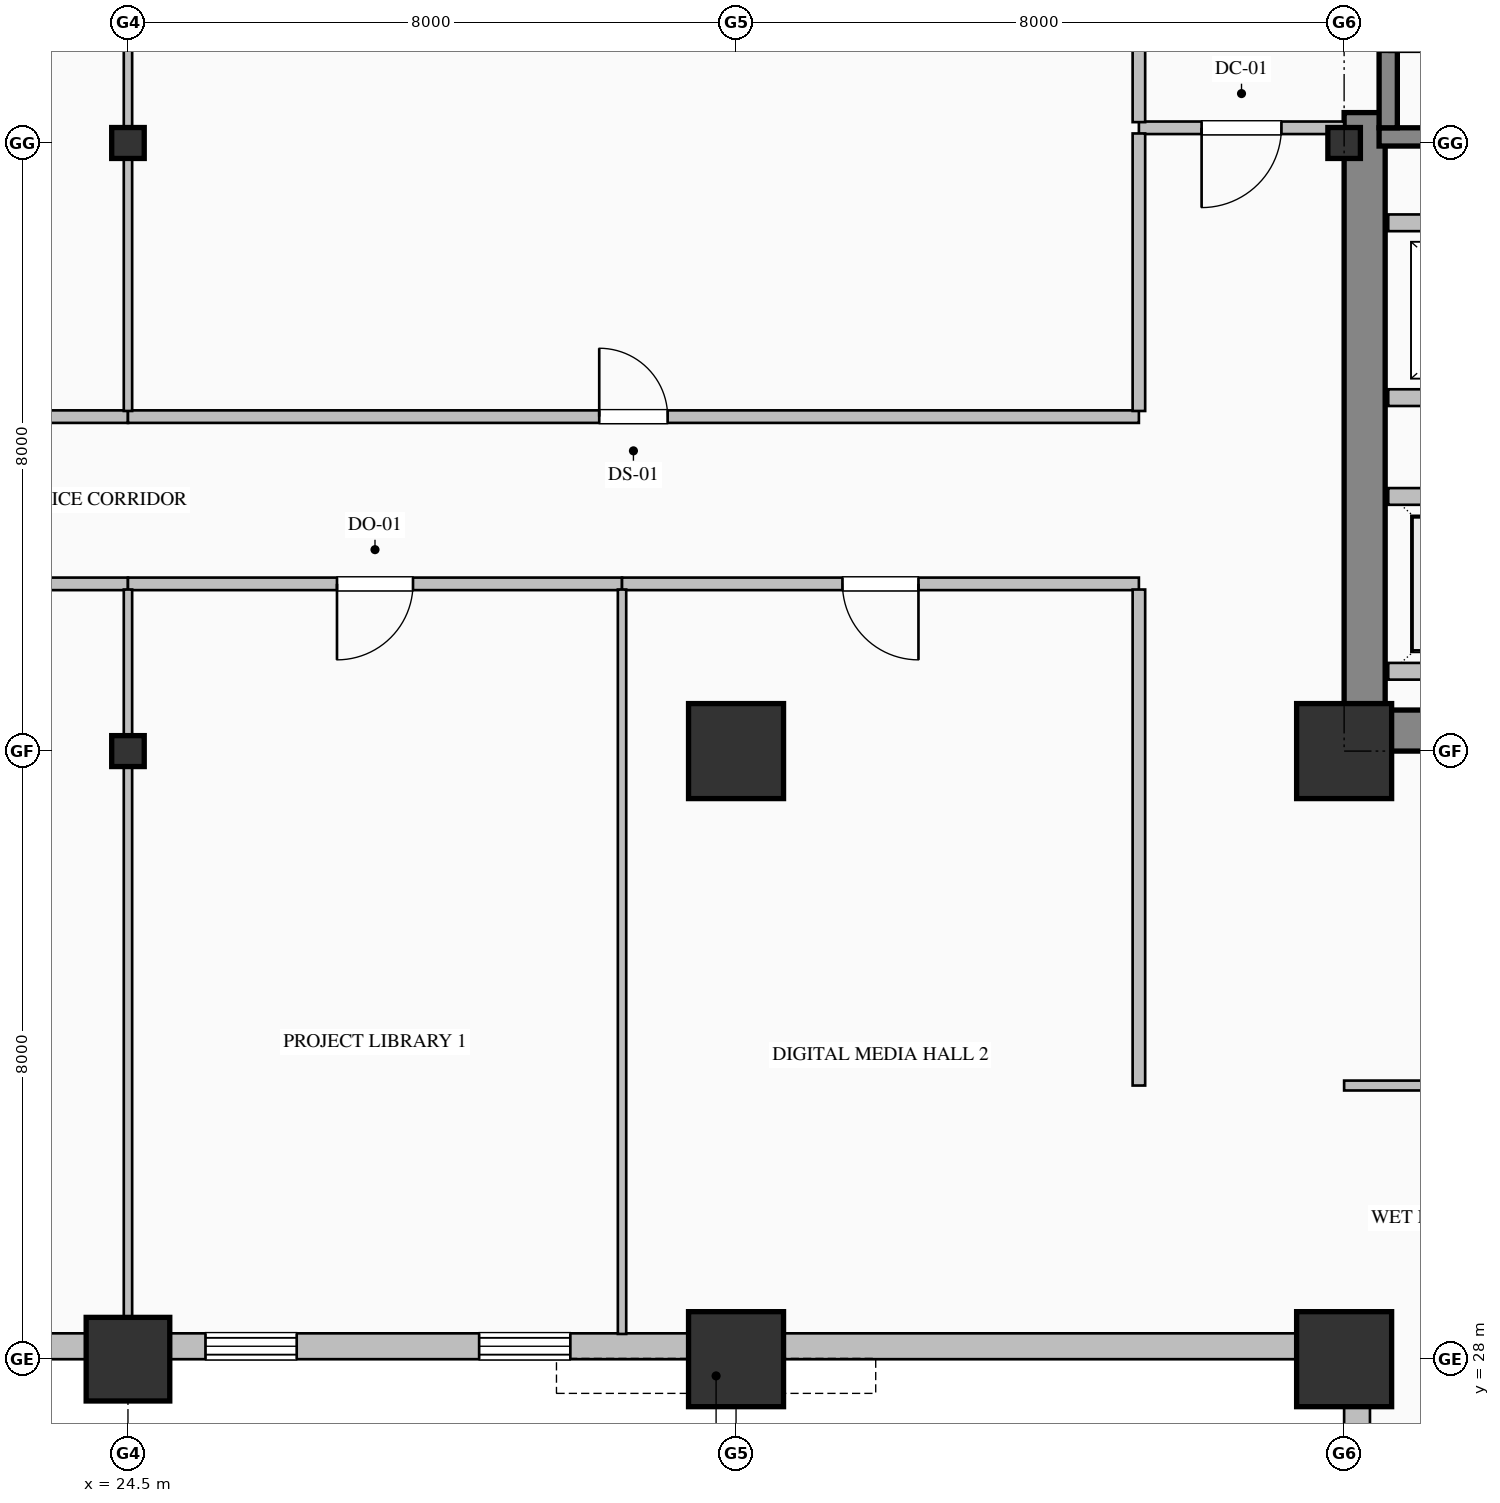
"""IFC4 building model, lengths in metres.
Left out: names, types, materials, properties, quantities, classifications, styles, units other than length and angle.
Written with IfcOpenShell. Run it as: python <this file> out.ifc"""

import sys

from ifc_helpers import new_model, si_unit, direction, frame, frame_2d, origin, origin_2d, place, context, subcontext, project, spatial, rectangle, hollow_rectangle, i_section, extrude, element, fill, save


model = new_model("IFC4")
c1 = context("Model", 3, precision=1e-05, world=origin(), true_north=direction((0.0, 1.0)))
c2 = subcontext(c1, "Body", "Model", "MODEL_VIEW")
j1 = project(units=[si_unit("LENGTHUNIT", "METRE"), si_unit("PLANEANGLEUNIT", "RADIAN")], contexts=[c1])
p1 = place(None, origin())
s1 = spatial("IfcSite", under=j1, at=p1, CompositionType="ELEMENT")
p2 = place(p1, origin())
s2 = spatial("IfcBuilding", under=s1, at=p2, CompositionType="ELEMENT")
p3 = place(p2, frame((0.0, 0.0, 56.2)))
s3 = spatial("IfcBuildingStorey", under=s2, at=p3, CompositionType="ELEMENT", Elevation=56.2)
p4 = place(p3, frame((40.77, 36.54, 0.0), z_axis=(0.0, 0.0, 1.0), x_axis=(0.0, 1.0, 0.0)))
e1 = element("IfcWall", 1, at=p4, inside=s3, PredefinedType="SHEAR", context=c2, shape_type="SweptSolid", body=[
    extrude(rectangle(XDim=7.86, YDim=0.54, at=frame_2d((3.93, 0.0))), origin(), (0.0, 0.0, 1.0), 3.75),
])
p5 = place(p3, frame((40.5, 36.27, 0.0), z_axis=(0.0, 0.0, 1.0), x_axis=(1.0, 0.0, 0.0)))
e2 = element("IfcWall", 2, at=p5, inside=s3, PredefinedType="SHEAR", context=c2, shape_type="SweptSolid", body=[
    extrude(rectangle(XDim=1.7, YDim=0.54, at=frame_2d((0.85, 0.0))), origin(), (0.0, 0.0, 1.0), 3.75),
])
p6 = place(p3, frame((24.5, 28.0, 0.0), z_axis=(0.0, 0.0, 1.0), x_axis=(1.0, 0.0, 0.0)))
e3 = element("IfcColumn", 3, at=p6, inside=s3, PredefinedType="COLUMN", context=c2, shape_type="SweptSolid", body=[
    extrude(hollow_rectangle(XDim=1.1, YDim=1.1, WallThickness=0.04, at=origin_2d()), origin(), (0.0, 0.0, 1.0), 4.0),
])
for number, where, z_axis, x_axis in (
    (4, (24.5, 36.0, 0.0), (0.0, 0.0, 1.0), (1.0, 0.0, 0.0)),
    (5, (24.5, 44.0, 0.0), (0.0, 0.0, 1.0), (1.0, 0.0, 0.0)),
):
    element("IfcColumn", number, at=place(p3, frame(where, z_axis=z_axis, x_axis=x_axis)), inside=s3, PredefinedType="COLUMN", context=c2, shape_type="SweptSolid", body=[
        extrude(i_section(OverallWidth=0.407, OverallDepth=0.428, WebThickness=0.02, FlangeThickness=0.035, FilletRadius=0.022, at=origin_2d()), origin(), (0.0, 0.0, 1.0), 4.0),
    ])
for number, where, z_axis, x_axis in (
    (6, (32.5, 28.0, 0.0), (0.0, 0.0, 1.0), (1.0, 0.0, 0.0)),
    (7, (32.5, 36.0, 0.0), (0.0, 0.0, 1.0), (1.0, 0.0, 0.0)),
    (8, (40.5, 28.0, 0.0), (0.0, 0.0, 1.0), (1.0, 0.0, 0.0)),
    (9, (40.5, 36.0, 0.0), (0.0, 0.0, 1.0), (1.0, 0.0, 0.0)),
):
    element("IfcColumn", number, at=place(p3, frame(where, z_axis=z_axis, x_axis=x_axis)), inside=s3, PredefinedType="COLUMN", context=c2, shape_type="SweptSolid", body=[
        extrude(hollow_rectangle(XDim=1.25, YDim=1.25, WallThickness=0.045, at=origin_2d()), origin(), (0.0, 0.0, 1.0), 4.0),
    ])
p7 = place(p3, frame((40.5, 44.0, 0.0), z_axis=(0.0, 0.0, 1.0), x_axis=(1.0, 0.0, 0.0)))
e10 = element("IfcColumn", 10, at=p7, inside=s3, PredefinedType="COLUMN", context=c2, shape_type="SweptSolid", body=[
    extrude(i_section(OverallWidth=0.407, OverallDepth=0.428, WebThickness=0.02, FlangeThickness=0.035, FilletRadius=0.022, at=origin_2d()), origin(), (0.0, 0.0, 1.0), 4.0),
])
p8 = place(p3, frame((40.67, 8.0, 0.0), z_axis=(0.0, 0.0, 1.0), x_axis=(0.0, 1.0, 0.0)))
e11 = element("IfcWall", 11, at=p8, inside=s3, PredefinedType="SOLIDWALL", context=c2, shape_type="SweptSolid", body=[
    extrude(rectangle(XDim=20.34, YDim=0.34, at=frame_2d((10.17, 0.0))), origin(), (0.0, 0.0, 1.0), 3.05),
])
p9 = place(p8, frame((6.6, 0.0, 0.7)))
e12 = element("IfcOpeningElement", 12, at=p9, cuts=e11, PredefinedType="OPENING", context=c2, shape_type="SweptSolid", body=[
    extrude(rectangle(XDim=1.2, YDim=1.85, at=frame_2d((0.6, 0.925))), frame((0.0, 0.18, 0.0), z_axis=(0.0, -1.0, 0.0), x_axis=(1.0, 0.0, 0.0)), (0.0, 0.0, 1.0), 0.36),
])
p10 = place(p8, frame((13.8, 0.0, 0.7)))
e13 = element("IfcOpeningElement", 13, at=p10, cuts=e11, PredefinedType="OPENING", context=c2, shape_type="SweptSolid", body=[
    extrude(rectangle(XDim=1.2, YDim=1.85, at=frame_2d((0.6, 0.925))), frame((0.0, 0.18, 0.0), z_axis=(0.0, -1.0, 0.0), x_axis=(1.0, 0.0, 0.0)), (0.0, 0.0, 1.0), 0.36),
])
p11 = place(p3, frame((40.52, 28.17, 0.0), z_axis=(0.0, 0.0, 1.0), x_axis=(-1.0, 0.0, 0.0)))
e14 = element("IfcWall", 14, at=p11, inside=s3, PredefinedType="SOLIDWALL", context=c2, shape_type="SweptSolid", body=[
    extrude(rectangle(XDim=36.52, YDim=0.34, at=frame_2d((18.26, 0.0))), origin(), (0.0, 0.0, 1.0), 3.05),
])
p12 = place(p11, frame((10.2, 0.0, 0.7)))
e15 = element("IfcOpeningElement", 15, at=p12, cuts=e14, PredefinedType="OPENING", context=c2, shape_type="SweptSolid", body=[
    extrude(rectangle(XDim=1.2, YDim=1.85, at=frame_2d((0.6, 0.925))), frame((0.0, 0.18, 0.0), z_axis=(0.0, -1.0, 0.0), x_axis=(1.0, 0.0, 0.0)), (0.0, 0.0, 1.0), 0.36),
])
p13 = place(p11, frame((13.8, 0.0, 0.7)))
e16 = element("IfcOpeningElement", 16, at=p13, cuts=e14, PredefinedType="OPENING", context=c2, shape_type="SweptSolid", body=[
    extrude(rectangle(XDim=1.2, YDim=1.85, at=frame_2d((0.6, 0.925))), frame((0.0, 0.18, 0.0), z_axis=(0.0, -1.0, 0.0), x_axis=(1.0, 0.0, 0.0)), (0.0, 0.0, 1.0), 0.36),
])
p14 = place(p11, frame((17.4, 0.0, 0.7)))
e17 = element("IfcOpeningElement", 17, at=p14, cuts=e14, PredefinedType="OPENING", context=c2, shape_type="SweptSolid", body=[
    extrude(rectangle(XDim=1.2, YDim=1.85, at=frame_2d((0.6, 0.925))), frame((0.0, 0.18, 0.0), z_axis=(0.0, -1.0, 0.0), x_axis=(1.0, 0.0, 0.0)), (0.0, 0.0, 1.0), 0.36),
])
p15 = place(p11, frame((21.0, 0.0, 0.7)))
e18 = element("IfcOpeningElement", 18, at=p15, cuts=e14, PredefinedType="OPENING", context=c2, shape_type="SweptSolid", body=[
    extrude(rectangle(XDim=1.2, YDim=1.85, at=frame_2d((0.6, 0.925))), frame((0.0, 0.18, 0.0), z_axis=(0.0, -1.0, 0.0), x_axis=(1.0, 0.0, 0.0)), (0.0, 0.0, 1.0), 0.36),
])
p16 = place(p11, frame((28.2, 0.0, 0.7)))
e19 = element("IfcOpeningElement", 19, at=p16, cuts=e14, PredefinedType="OPENING", context=c2, shape_type="SweptSolid", body=[
    extrude(rectangle(XDim=1.2, YDim=1.85, at=frame_2d((0.6, 0.925))), frame((0.0, 0.18, 0.0), z_axis=(0.0, -1.0, 0.0), x_axis=(1.0, 0.0, 0.0)), (0.0, 0.0, 1.0), 0.36),
])
p17 = place(p3, frame((49.04, 44.08, 0.0), z_axis=(0.0, 0.0, 1.0), x_axis=(-1.0, 0.0, 0.0)))
e20 = element("IfcWall", 20, at=p17, inside=s3, PredefinedType="SOLIDWALL", context=c2, shape_type="SweptSolid", body=[
    extrude(rectangle(XDim=8.08, YDim=0.24, at=frame_2d((4.04, 0.0))), origin(), (0.0, 0.0, 1.0), 4.0),
])
p18 = place(p3, frame((41.08, 47.35, 0.0), z_axis=(0.0, 0.0, 1.0), x_axis=(0.0, -1.0, 0.0)))
e21 = element("IfcWall", 21, at=p18, inside=s3, PredefinedType="SOLIDWALL", context=c2, shape_type="SweptSolid", body=[
    extrude(rectangle(XDim=3.15, YDim=0.24, at=frame_2d((1.575, 0.0))), origin(), (0.0, 0.0, 1.0), 4.0),
])
p19 = place(p18, frame((1.0, 0.0, 0.0)))
e22 = element("IfcOpeningElement", 22, at=p19, cuts=e21, PredefinedType="OPENING", context=c2, shape_type="SweptSolid", body=[
    extrude(rectangle(XDim=1.15, YDim=2.2, at=frame_2d((0.575, 1.1))), frame((0.0, 0.13, 0.0), z_axis=(0.0, -1.0, 0.0), x_axis=(1.0, 0.0, 0.0)), (0.0, 0.0, 1.0), 0.26),
])
p20 = place(p3, frame((49.32, 37.05, 0.0), z_axis=(0.0, 0.0, 1.0), x_axis=(-1.0, 0.0, 0.0)))
e23 = element("IfcWall", 23, at=p20, inside=s3, PredefinedType="PARTITIONING", context=c2, shape_type="SweptSolid", body=[
    extrude(rectangle(XDim=8.24, YDim=0.22, at=frame_2d((4.12, 0.0))), origin(), (0.0, 0.0, 1.0), 3.75),
])
p21 = place(p20, frame((6.37, 0.0, 0.0)))
e24 = element("IfcOpeningElement", 24, at=p21, cuts=e23, PredefinedType="OPENING", context=c2, shape_type="SweptSolid", body=[
    extrude(rectangle(XDim=1.1, YDim=2.2, at=frame_2d((0.55, 1.1))), frame((0.0, 0.12, 0.0), z_axis=(0.0, -1.0, 0.0), x_axis=(1.0, 0.0, 0.0)), (0.0, 0.0, 1.0), 0.24),
])
p22 = place(p20, frame((3.57, 0.0, 0.0)))
e25 = element("IfcOpeningElement", 25, at=p22, cuts=e23, PredefinedType="OPENING", context=c2, shape_type="SweptSolid", body=[
    extrude(rectangle(XDim=1.1, YDim=2.2, at=frame_2d((0.55, 1.1))), frame((0.0, 0.12, 0.0), z_axis=(0.0, -1.0, 0.0), x_axis=(1.0, 0.0, 0.0)), (0.0, 0.0, 1.0), 0.24),
])
p23 = place(p20, frame((0.77, 0.0, 0.0)))
e26 = element("IfcOpeningElement", 26, at=p23, cuts=e23, PredefinedType="OPENING", context=c2, shape_type="SweptSolid", body=[
    extrude(rectangle(XDim=1.1, YDim=2.2, at=frame_2d((0.55, 1.1))), frame((0.0, 0.12, 0.0), z_axis=(0.0, -1.0, 0.0), x_axis=(1.0, 0.0, 0.0)), (0.0, 0.0, 1.0), 0.24),
])
for number, where, z_axis, x_axis in (
    (27, (41.08, 39.35, 0.0), (0.0, 0.0, 1.0), (1.0, 0.0, 0.0)),
    (28, (49.32, 40.65, 0.0), (0.0, 0.0, 1.0), (-1.0, 0.0, 0.0)),
    (29, (41.08, 42.95, 0.0), (0.0, 0.0, 1.0), (1.0, 0.0, 0.0)),
):
    element("IfcWall", number, at=place(p3, frame(where, z_axis=z_axis, x_axis=x_axis)), inside=s3, PredefinedType="PARTITIONING", context=c2, shape_type="SweptSolid", body=[
        extrude(rectangle(XDim=8.24, YDim=0.22, at=frame_2d((4.12, 0.0))), origin(), (0.0, 0.0, 1.0), 3.75),
    ])
p24 = place(p3, frame((40.5, 44.2, 0.0), z_axis=(0.0, 0.0, 1.0), x_axis=(-1.0, 0.0, 0.0)))
e30 = element("IfcWall", 30, at=p24, inside=s3, PredefinedType="PARTITIONING", context=c2, shape_type="SweptSolid", body=[
    extrude(rectangle(XDim=2.7, YDim=0.165, at=frame_2d((1.35, 0.0))), origin(), (0.0, 0.0, 1.0), 3.75),
])
p25 = place(p24, frame((0.825, 0.0, 0.0)))
e31 = element("IfcOpeningElement", 31, at=p25, cuts=e30, PredefinedType="OPENING", context=c2, shape_type="SweptSolid", body=[
    extrude(rectangle(XDim=1.05, YDim=2.15, at=frame_2d((0.525, 1.075))), frame((0.0, 0.093, 0.0), z_axis=(0.0, -1.0, 0.0), x_axis=(1.0, 0.0, 0.0)), (0.0, 0.0, 1.0), 0.185),
])
p26 = place(p3, frame((37.8, 44.274, 0.0), z_axis=(0.0, 0.0, 1.0), x_axis=(0.0, 1.0, 0.0)))
e32 = element("IfcWall", 32, at=p26, inside=s3, PredefinedType="PARTITIONING", context=c2, shape_type="SweptSolid", body=[
    extrude(rectangle(XDim=3.051, YDim=0.165, at=frame_2d((1.525, 0.0))), origin(), (0.0, 0.0, 1.0), 3.75),
])
p27 = place(p3, frame((24.5, 38.2, 0.0), z_axis=(0.0, 0.0, 1.0), x_axis=(-1.0, 0.0, 0.0)))
e33 = element("IfcWall", 33, at=p27, inside=s3, PredefinedType="PARTITIONING", context=c2, shape_type="SweptSolid", body=[
    extrude(rectangle(XDim=15.5, YDim=0.165, at=frame_2d((7.75, 0.0))), origin(), (0.0, 0.0, 1.0), 3.75),
])
p28 = place(p27, frame((7.25, 0.0, 0.0)))
e34 = element("IfcOpeningElement", 34, at=p28, cuts=e33, PredefinedType="OPENING", context=c2, shape_type="SweptSolid", body=[
    extrude(rectangle(XDim=1.0, YDim=2.15, at=frame_2d((0.5, 1.075))), frame((0.0, 0.093, 0.0), z_axis=(0.0, -1.0, 0.0), x_axis=(1.0, 0.0, 0.0)), (0.0, 0.0, 1.0), 0.185),
])
p29 = place(p3, frame((9.0, 40.4, 0.0), z_axis=(0.0, 0.0, 1.0), x_axis=(1.0, 0.0, 0.0)))
e35 = element("IfcWall", 35, at=p29, inside=s3, PredefinedType="PARTITIONING", context=c2, shape_type="SweptSolid", body=[
    extrude(rectangle(XDim=15.5, YDim=0.165, at=frame_2d((7.75, 0.0))), origin(), (0.0, 0.0, 1.0), 3.75),
])
p30 = place(p3, frame((24.5, 40.4, 0.0), z_axis=(0.0, 0.0, 1.0), x_axis=(1.0, 0.0, 0.0)))
e36 = element("IfcWall", 36, at=p30, inside=s3, PredefinedType="PARTITIONING", context=c2, shape_type="SweptSolid", body=[
    extrude(rectangle(XDim=13.3, YDim=0.165, at=frame_2d((6.65, 0.0))), origin(), (0.0, 0.0, 1.0), 3.75),
])
p31 = place(p30, frame((6.2, 0.0, 0.0)))
e37 = element("IfcOpeningElement", 37, at=p31, cuts=e36, PredefinedType="OPENING", context=c2, shape_type="SweptSolid", body=[
    extrude(rectangle(XDim=0.9, YDim=2.15, at=frame_2d((0.45, 1.075))), frame((0.0, 0.093, 0.0), z_axis=(0.0, -1.0, 0.0), x_axis=(1.0, 0.0, 0.0)), (0.0, 0.0, 1.0), 0.185),
])
p32 = place(p3, frame((31.0, 38.2, 0.0), z_axis=(0.0, 0.0, 1.0), x_axis=(-1.0, 0.0, 0.0)))
e38 = element("IfcWall", 38, at=p32, inside=s3, PredefinedType="PARTITIONING", context=c2, shape_type="SweptSolid", body=[
    extrude(rectangle(XDim=6.5, YDim=0.165, at=frame_2d((3.25, 0.0))), origin(), (0.0, 0.0, 1.0), 3.75),
])
p33 = place(p32, frame((2.75, 0.0, 0.0)))
e39 = element("IfcOpeningElement", 39, at=p33, cuts=e38, PredefinedType="OPENING", context=c2, shape_type="SweptSolid", body=[
    extrude(rectangle(XDim=1.0, YDim=2.15, at=frame_2d((0.5, 1.075))), frame((0.0, 0.093, 0.0), z_axis=(0.0, -1.0, 0.0), x_axis=(1.0, 0.0, 0.0)), (0.0, 0.0, 1.0), 0.185),
])
p34 = place(p3, frame((37.8, 38.2, 0.0), z_axis=(0.0, 0.0, 1.0), x_axis=(-1.0, 0.0, 0.0)))
e40 = element("IfcWall", 40, at=p34, inside=s3, PredefinedType="PARTITIONING", context=c2, shape_type="SweptSolid", body=[
    extrude(rectangle(XDim=6.8, YDim=0.165, at=frame_2d((3.4, 0.0))), origin(), (0.0, 0.0, 1.0), 3.75),
])
p35 = place(p34, frame((2.9, 0.0, 0.0)))
e41 = element("IfcOpeningElement", 41, at=p35, cuts=e40, PredefinedType="OPENING", context=c2, shape_type="SweptSolid", body=[
    extrude(rectangle(XDim=1.0, YDim=2.15, at=frame_2d((0.5, 1.075))), frame((0.0, 0.093, 0.0), z_axis=(0.0, -1.0, 0.0), x_axis=(1.0, 0.0, 0.0)), (0.0, 0.0, 1.0), 0.185),
])
p36 = place(p3, frame((37.8, 40.475, 0.0), z_axis=(0.0, 0.0, 1.0), x_axis=(0.0, 1.0, 0.0)))
e42 = element("IfcWall", 42, at=p36, inside=s3, PredefinedType="PARTITIONING", context=c2, shape_type="SweptSolid", body=[
    extrude(rectangle(XDim=3.651, YDim=0.165, at=frame_2d((1.825, 0.0))), origin(), (0.0, 0.0, 1.0), 3.75),
])
p37 = place(p3, frame((37.8, 31.6, 0.0), z_axis=(0.0, 0.0, 1.0), x_axis=(0.0, 1.0, 0.0)))
e43 = element("IfcWall", 43, at=p37, inside=s3, PredefinedType="PARTITIONING", context=c2, shape_type="SweptSolid", body=[
    extrude(rectangle(XDim=6.525, YDim=0.165, at=frame_2d((3.263, 0.0))), origin(), (0.0, 0.0, 1.0), 3.75),
])
p38 = place(p3, frame((43.0, 31.6, 0.0), z_axis=(0.0, 0.0, 1.0), x_axis=(-1.0, 0.0, 0.0)))
e44 = element("IfcWall", 44, at=p38, inside=s3, PredefinedType="PARTITIONING", context=c2, shape_type="SweptSolid", body=[
    extrude(rectangle(XDim=2.5, YDim=0.13, at=frame_2d((1.25, 0.0))), origin(), (0.0, 0.0, 1.0), 3.75),
])
p39 = place(p3, frame((24.5, 51.668, 0.0), z_axis=(0.0, 0.0, 1.0), x_axis=(0.0, -1.0, 0.0)))
e45 = element("IfcWall", 45, at=p39, inside=s3, PredefinedType="MOVABLE", context=c2, shape_type="SweptSolid", body=[
    extrude(rectangle(XDim=11.193, YDim=0.11, at=frame_2d((5.597, 0.0))), origin(), (0.0, 0.0, 1.0), 3.042),
])
p40 = place(p3, frame((24.5, 38.125, 0.0), z_axis=(0.0, 0.0, 1.0), x_axis=(0.0, -1.0, 0.0)))
e46 = element("IfcWall", 46, at=p40, inside=s3, PredefinedType="MOVABLE", context=c2, shape_type="SweptSolid", body=[
    extrude(rectangle(XDim=9.793, YDim=0.11, at=frame_2d((4.897, 0.0))), origin(), (0.0, 0.0, 1.0), 3.042),
])
p41 = place(p3, frame((31.0, 38.125, 0.0), z_axis=(0.0, 0.0, 1.0), x_axis=(0.0, -1.0, 0.0)))
e47 = element("IfcWall", 47, at=p41, inside=s3, PredefinedType="MOVABLE", context=c2, shape_type="SweptSolid", body=[
    extrude(rectangle(XDim=9.793, YDim=0.11, at=frame_2d((4.897, 0.0))), origin(), (0.0, 0.0, 1.0), 3.75),
])
p42 = place(p12, origin())
e48 = element("IfcWindow", 48, at=p42, inside=s3, PartitioningType="DOUBLE_PANEL_VERTICAL", PredefinedType="WINDOW", context=c2, shape_type="SweptSolid", body=[
    extrude(rectangle(XDim=1.2, YDim=1.85, at=frame_2d((0.6, 0.925))), frame((0.0, 0.15, 0.0), z_axis=(0.0, -1.0, 0.0), x_axis=(1.0, 0.0, 0.0)), (0.0, 0.0, 1.0), 0.06),
])
fill(e15, e48)
p43 = place(p13, origin())
e49 = element("IfcWindow", 49, at=p43, inside=s3, PartitioningType="DOUBLE_PANEL_VERTICAL", PredefinedType="WINDOW", context=c2, shape_type="SweptSolid", body=[
    extrude(rectangle(XDim=1.2, YDim=1.85, at=frame_2d((0.6, 0.925))), frame((0.0, 0.15, 0.0), z_axis=(0.0, -1.0, 0.0), x_axis=(1.0, 0.0, 0.0)), (0.0, 0.0, 1.0), 0.06),
])
fill(e16, e49)
p44 = place(p25, origin())
e50 = element("IfcDoor", 50, at=p44, inside=s3, OperationType="SINGLE_SWING_RIGHT", PredefinedType="DOOR", context=c2, shape_type="SweptSolid", body=[
    extrude(rectangle(XDim=1.05, YDim=2.15, at=frame_2d((0.525, 1.075))), frame((0.0, 0.025, 0.0), z_axis=(0.0, -1.0, 0.0), x_axis=(1.0, 0.0, 0.0)), (0.0, 0.0, 1.0), 0.05),
])
fill(e31, e50)
p45 = place(p31, origin())
e51 = element("IfcDoor", 51, at=p45, inside=s3, OperationType="SINGLE_SWING_LEFT", PredefinedType="DOOR", context=c2, shape_type="SweptSolid", body=[
    extrude(rectangle(XDim=0.9, YDim=2.15, at=frame_2d((0.45, 1.075))), frame((0.0, 0.025, 0.0), z_axis=(0.0, -1.0, 0.0), x_axis=(1.0, 0.0, 0.0)), (0.0, 0.0, 1.0), 0.05),
])
fill(e37, e51)
p46 = place(p33, origin())
e52 = element("IfcDoor", 52, at=p46, inside=s3, OperationType="SINGLE_SWING_RIGHT", PredefinedType="DOOR", context=c2, shape_type="SweptSolid", body=[
    extrude(rectangle(XDim=1.0, YDim=2.15, at=frame_2d((0.5, 1.075))), frame((0.0, 0.025, 0.0), z_axis=(0.0, -1.0, 0.0), x_axis=(1.0, 0.0, 0.0)), (0.0, 0.0, 1.0), 0.05),
])
fill(e39, e52)
p47 = place(p35, origin())
e53 = element("IfcDoor", 53, at=p47, inside=s3, OperationType="SINGLE_SWING_LEFT", PredefinedType="DOOR", context=c2, shape_type="SweptSolid", body=[
    extrude(rectangle(XDim=1.0, YDim=2.15, at=frame_2d((0.5, 1.075))), frame((0.0, 0.025, 0.0), z_axis=(0.0, -1.0, 0.0), x_axis=(1.0, 0.0, 0.0)), (0.0, 0.0, 1.0), 0.05),
])
fill(e41, e53)
save(model, sys.argv[1])
